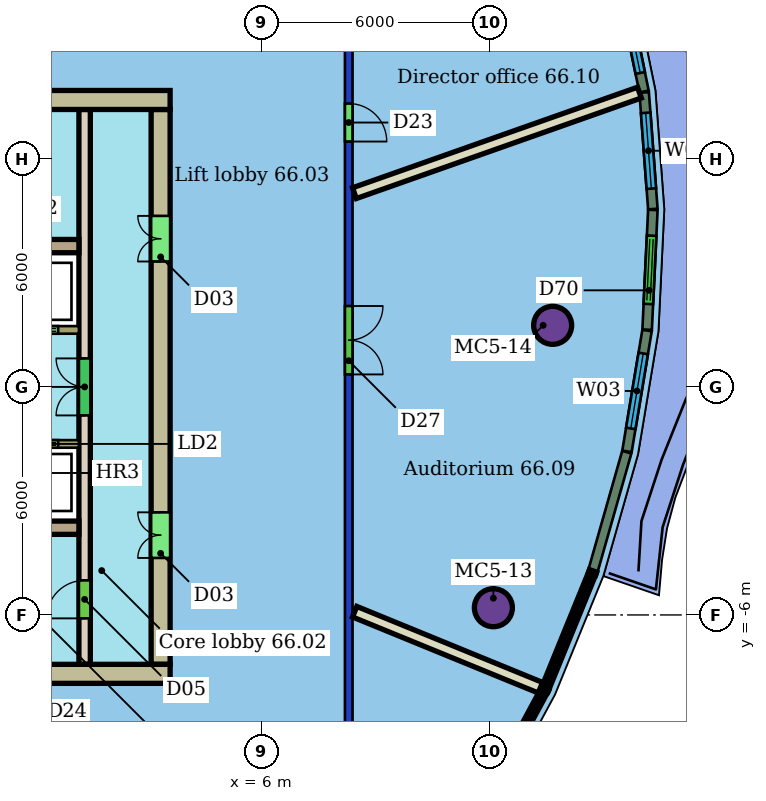
"""IFC4 building model, lengths in metres.
Left out: names, types, materials, properties, quantities, classifications, styles, units other than length and angle.
Written with IfcOpenShell. Run it as: python <this file> out.ifc"""

import sys

from ifc_helpers import new_model, si_unit, direction, frame, frame_2d, origin, origin_2d, place, context, subcontext, project, spatial, rectangle, hollow_circle, extrude, element, fill, save


model = new_model("IFC4")
c1 = context("Model", 3, precision=1e-05, world=origin(), true_north=direction((0.0, 1.0)))
c2 = subcontext(c1, "Body", "Model", "MODEL_VIEW")
j1 = project(units=[si_unit("LENGTHUNIT", "METRE"), si_unit("PLANEANGLEUNIT", "RADIAN")], contexts=[c1])
p1 = place(None, origin())
s1 = spatial("IfcSite", under=j1, at=p1, CompositionType="ELEMENT")
p2 = place(p1, origin())
s2 = spatial("IfcBuilding", under=s1, at=p2, CompositionType="ELEMENT")
p3 = place(p2, frame((0.0, 0.0, 268.5)))
s3 = spatial("IfcBuildingStorey", under=s2, at=p3, CompositionType="ELEMENT", Elevation=268.5)
for number, where, z_axis, x_axis in (
    (1, (12.106, -5.81, 0.0), (0.0, 0.0, 1.0), (1.0, 0.0, 0.0)),
    (2, (13.666, 1.62, 0.0), (0.0, 0.0, 1.0), (1.0, 0.0, 0.0)),
):
    element("IfcColumn", number, at=place(p3, frame(where, z_axis=z_axis, x_axis=x_axis)), inside=s3, PredefinedType="COLUMN", context=c2, shape_type="SweptSolid", body=[
        extrude(hollow_circle(Radius=0.5, WallThickness=0.04, at=origin_2d()), origin(), (0.0, 0.0, 1.0), 3.45),
    ])
p4 = place(p3, frame((8.3, 9.8, 0.0), z_axis=(0.0, 0.0, 1.0), x_axis=(0.0, -1.0, 0.0)))
e3 = element("IfcWall", 3, at=p4, inside=s3, PredefinedType="PARTITIONING", context=c2, shape_type="SweptSolid", body=[
    extrude(rectangle(XDim=19.6, YDim=0.2, at=frame_2d((9.8, 0.0))), origin(), (0.0, 0.0, 1.0), 3.1),
])
p5 = place(p4, frame((7.671, 0.0, 0.0)))
e4 = element("IfcOpeningElement", 4, at=p5, cuts=e3, PredefinedType="OPENING", context=c2, shape_type="SweptSolid", body=[
    extrude(rectangle(XDim=1.8, YDim=2.4, at=frame_2d((0.9, 1.2))), frame((0.0, 0.11, 0.0), z_axis=(0.0, -1.0, 0.0), x_axis=(1.0, 0.0, 0.0)), (0.0, 0.0, 1.0), 0.22),
])
p6 = place(p4, frame((2.344, 0.0, 0.0)))
e5 = element("IfcOpeningElement", 5, at=p6, cuts=e3, PredefinedType="OPENING", context=c2, shape_type="SweptSolid", body=[
    extrude(rectangle(XDim=1.0, YDim=2.4, at=frame_2d((0.5, 1.2))), frame((0.0, 0.11, 0.0), z_axis=(0.0, -1.0, 0.0), x_axis=(1.0, 0.0, 0.0)), (0.0, 0.0, 1.0), 0.22),
])
p7 = place(p3, frame((13.344, -7.915, 0.0), z_axis=(0.0, 0.0, 1.0), x_axis=(-0.925520438103, 0.378697661274, 0.0)))
e6 = element("IfcWall", 6, at=p7, inside=s3, PredefinedType="PARTITIONING", context=c2, shape_type="SweptSolid", body=[
    extrude(rectangle(XDim=5.28, YDim=0.3, at=frame_2d((2.64, 0.0))), origin(), (0.0, 0.0, 1.0), 3.45),
])
p8 = place(p3, frame((15.949, 7.744, 0.0), z_axis=(0.0, 0.0, 1.0), x_axis=(-0.943031701319, -0.332702885933, 0.0)))
e7 = element("IfcWall", 7, at=p8, inside=s3, PredefinedType="PARTITIONING", context=c2, shape_type="SweptSolid", body=[
    extrude(rectangle(XDim=7.952, YDim=0.3, at=frame_2d((3.976, 0.0))), origin(), (0.0, 0.0, 1.0), 3.45),
])
p9 = place(p3, frame((14.731, -4.826, 0.0), z_axis=(0.0, 0.0, 1.0), x_axis=(0.27386313883, 0.96176867343, 0.0)))
e8 = element("IfcWall", 8, at=p9, inside=s3, PredefinedType="SOLIDWALL", context=c2, shape_type="SweptSolid", body=[
    extrude(rectangle(XDim=3.232, YDim=0.25, at=frame_2d((1.616, 0.0))), origin(), (0.0, 0.0, 1.0), 3.15),
])
p10 = place(p3, frame((15.621, -1.696, 0.0), z_axis=(0.0, 0.0, 1.0), x_axis=(0.163956663746, 0.986467542504, 0.0)))
e9 = element("IfcWall", 9, at=p10, inside=s3, PredefinedType="SOLIDWALL", context=c2, shape_type="SweptSolid", body=[
    extrude(rectangle(XDim=3.222, YDim=0.25, at=frame_2d((1.611, 0.0))), origin(), (0.0, 0.0, 1.0), 3.15),
])
p11 = place(p10, frame((0.611, 0.0, 0.9)))
e10 = element("IfcOpeningElement", 10, at=p11, cuts=e9, PredefinedType="OPENING", context=c2, shape_type="SweptSolid", body=[
    extrude(rectangle(XDim=2.0, YDim=2.1, at=frame_2d((1.0, 1.05))), frame((0.0, 0.135, 0.0), z_axis=(0.0, -1.0, 0.0), x_axis=(1.0, 0.0, 0.0)), (0.0, 0.0, 1.0), 0.27),
])
p12 = place(p3, frame((16.152, 1.506, 0.0), z_axis=(0.0, 0.0, 1.0), x_axis=(0.047748991173, 0.998859366398, 0.0)))
e11 = element("IfcWall", 11, at=p12, inside=s3, PredefinedType="SOLIDWALL", context=c2, shape_type="SweptSolid", body=[
    extrude(rectangle(XDim=3.155, YDim=0.25, at=frame_2d((1.577, 0.0))), origin(), (0.0, 0.0, 1.0), 3.15),
])
p13 = place(p12, frame((0.677, 0.0, 0.0)))
e12 = element("IfcOpeningElement", 12, at=p13, cuts=e11, PredefinedType="OPENING", context=c2, shape_type="SweptSolid", body=[
    extrude(rectangle(XDim=1.8, YDim=2.4, at=frame_2d((0.9, 1.2))), frame((0.0, 0.135, 0.0), z_axis=(0.0, -1.0, 0.0), x_axis=(1.0, 0.0, 0.0)), (0.0, 0.0, 1.0), 0.27),
])
p14 = place(p3, frame((16.302, 4.68, 0.0), z_axis=(0.0, 0.0, 1.0), x_axis=(-0.074336319404, 0.997233228296, 0.0)))
e13 = element("IfcWall", 13, at=p14, inside=s3, PredefinedType="SOLIDWALL", context=c2, shape_type="SweptSolid", body=[
    extrude(rectangle(XDim=3.077, YDim=0.25, at=frame_2d((1.539, 0.0))), origin(), (0.0, 0.0, 1.0), 3.15),
])
p15 = place(p14, frame((0.539, 0.0, 0.9)))
e14 = element("IfcOpeningElement", 14, at=p15, cuts=e13, PredefinedType="OPENING", context=c2, shape_type="SweptSolid", body=[
    extrude(rectangle(XDim=2.0, YDim=2.1, at=frame_2d((1.0, 1.05))), frame((0.0, 0.135, 0.0), z_axis=(0.0, -1.0, 0.0), x_axis=(1.0, 0.0, 0.0)), (0.0, 0.0, 1.0), 0.27),
])
p16 = place(p3, frame((16.071, 7.773, 0.0), z_axis=(0.0, 0.0, 1.0), x_axis=(-0.201427510103, 0.979503424279, 0.0)))
e15 = element("IfcWall", 15, at=p16, inside=s3, PredefinedType="SOLIDWALL", context=c2, shape_type="SweptSolid", body=[
    extrude(rectangle(XDim=2.995, YDim=0.25, at=frame_2d((1.498, 0.0))), origin(), (0.0, 0.0, 1.0), 3.15),
])
p17 = place(p16, frame((0.498, 0.0, 0.9)))
e16 = element("IfcOpeningElement", 16, at=p17, cuts=e15, PredefinedType="OPENING", context=c2, shape_type="SweptSolid", body=[
    extrude(rectangle(XDim=2.0, YDim=2.1, at=frame_2d((1.0, 1.05))), frame((0.0, 0.135, 0.0), z_axis=(0.0, -1.0, 0.0), x_axis=(1.0, 0.0, 0.0)), (0.0, 0.0, 1.0), 0.27),
])
p18 = place(p3, frame((3.6, 7.55, 0.0), z_axis=(0.0, 0.0, 1.0), x_axis=(-1.0, 0.0, 0.0)))
e17 = element("IfcWall", 17, at=p18, inside=s3, PredefinedType="SHEAR", context=c2, shape_type="SweptSolid", body=[
    extrude(rectangle(XDim=9.6, YDim=0.5, at=frame_2d((4.8, 0.0))), origin(), (0.0, 0.0, 1.0), 3.3),
])
p19 = place(p18, frame((3.2, 0.0, 0.0)))
e18 = element("IfcOpeningElement", 18, at=p19, cuts=e17, PredefinedType="OPENING", context=c2, shape_type="SweptSolid", body=[
    extrude(rectangle(XDim=1.2, YDim=2.1, at=frame_2d((0.6, 1.05))), frame((0.0, 0.26, 0.0), z_axis=(0.0, -1.0, 0.0), x_axis=(1.0, 0.0, 0.0)), (0.0, 0.0, 1.0), 0.52),
])
p20 = place(p3, frame((-15.6, -7.55, 0.0), z_axis=(0.0, 0.0, 1.0), x_axis=(1.0, 0.0, 0.0)))
e19 = element("IfcWall", 19, at=p20, inside=s3, PredefinedType="SHEAR", context=c2, shape_type="SweptSolid", body=[
    extrude(rectangle(XDim=19.2, YDim=0.5, at=frame_2d((9.6, 0.0))), origin(), (0.0, 0.0, 1.0), 3.3),
])
p21 = place(p20, frame((3.6, 0.0, 0.0)))
e20 = element("IfcOpeningElement", 20, at=p21, cuts=e19, PredefinedType="OPENING", context=c2, shape_type="SweptSolid", body=[
    extrude(rectangle(XDim=1.2, YDim=2.1, at=frame_2d((0.6, 1.05))), frame((0.0, 0.26, 0.0), z_axis=(0.0, -1.0, 0.0), x_axis=(1.0, 0.0, 0.0)), (0.0, 0.0, 1.0), 0.52),
])
p22 = place(p3, frame((3.35, -7.3, 0.0), z_axis=(0.0, 0.0, 1.0), x_axis=(0.0, 1.0, 0.0)))
e21 = element("IfcWall", 21, at=p22, inside=s3, PredefinedType="SHEAR", context=c2, shape_type="SweptSolid", body=[
    extrude(rectangle(XDim=14.6, YDim=0.5, at=frame_2d((7.3, 0.0))), origin(), (0.0, 0.0, 1.0), 3.3),
])
p23 = place(p22, frame((2.8, 0.0, 0.0)))
e22 = element("IfcOpeningElement", 22, at=p23, cuts=e21, PredefinedType="OPENING", context=c2, shape_type="SweptSolid", body=[
    extrude(rectangle(XDim=1.2, YDim=2.1, at=frame_2d((0.6, 1.05))), frame((0.0, 0.26, 0.0), z_axis=(0.0, -1.0, 0.0), x_axis=(1.0, 0.0, 0.0)), (0.0, 0.0, 1.0), 0.52),
])
p24 = place(p22, frame((10.6, 0.0, 0.0)))
e23 = element("IfcOpeningElement", 23, at=p24, cuts=e21, PredefinedType="OPENING", context=c2, shape_type="SweptSolid", body=[
    extrude(rectangle(XDim=1.2, YDim=2.1, at=frame_2d((0.6, 1.05))), frame((0.0, 0.26, 0.0), z_axis=(0.0, -1.0, 0.0), x_axis=(1.0, 0.0, 0.0)), (0.0, 0.0, 1.0), 0.52),
])
for number, where, z_axis, x_axis in (
    (24, (-6.0, 3.705, 0.0), (0.0, 0.0, 1.0), (1.0, 0.0, 0.0)),
    (25, (-6.0, -3.705, 0.0), (0.0, 0.0, 1.0), (1.0, 0.0, 0.0)),
):
    element("IfcWall", number, at=place(p3, frame(where, z_axis=z_axis, x_axis=x_axis)), inside=s3, PredefinedType="SHEAR", context=c2, shape_type="SweptSolid", body=[
        extrude(rectangle(XDim=7.2, YDim=0.35, at=frame_2d((3.6, 0.0))), origin(), (0.0, 0.0, 1.0), 3.3),
    ])
p25 = place(p3, frame((1.35, -7.3, 0.0), z_axis=(0.0, 0.0, 1.0), x_axis=(0.0, 1.0, 0.0)))
e26 = element("IfcWall", 26, at=p25, inside=s3, PredefinedType="SHEAR", context=c2, shape_type="SweptSolid", body=[
    extrude(rectangle(XDim=14.6, YDim=0.3, at=frame_2d((7.3, 0.0))), origin(), (0.0, 0.0, 1.0), 3.3),
])
p26 = place(p25, frame((1.21, 0.0, 0.0)))
e27 = element("IfcOpeningElement", 27, at=p26, cuts=e26, PredefinedType="OPENING", context=c2, shape_type="SweptSolid", body=[
    extrude(rectangle(XDim=1.0, YDim=2.1, at=frame_2d((0.5, 1.05))), frame((0.0, 0.16, 0.0), z_axis=(0.0, -1.0, 0.0), x_axis=(1.0, 0.0, 0.0)), (0.0, 0.0, 1.0), 0.32),
])
p27 = place(p25, frame((6.55, 0.0, 0.0)))
e28 = element("IfcOpeningElement", 28, at=p27, cuts=e26, PredefinedType="OPENING", context=c2, shape_type="SweptSolid", body=[
    extrude(rectangle(XDim=1.5, YDim=2.1, at=frame_2d((0.75, 1.05))), frame((0.0, 0.16, 0.0), z_axis=(0.0, -1.0, 0.0), x_axis=(1.0, 0.0, 0.0)), (0.0, 0.0, 1.0), 0.32),
])
p28 = place(p3, frame((-13.2, 1.5, 0.0), z_axis=(0.0, 0.0, 1.0), x_axis=(1.0, 0.0, 0.0)))
e29 = element("IfcWall", 29, at=p28, inside=s3, PredefinedType="SHEAR", context=c2, shape_type="SweptSolid", body=[
    extrude(rectangle(XDim=14.4, YDim=0.2, at=frame_2d((7.2, 0.0))), origin(), (0.0, 0.0, 1.0), 3.3),
])
p29 = place(p28, frame((10.312, 0.0, 0.0)))
e30 = element("IfcOpeningElement", 30, at=p29, cuts=e29, PredefinedType="OPENING", context=c2, shape_type="SweptSolid", body=[
    extrude(rectangle(XDim=1.1, YDim=2.1, at=frame_2d((0.55, 1.05))), frame((0.0, 0.11, 0.0), z_axis=(0.0, -1.0, 0.0), x_axis=(1.0, 0.0, 0.0)), (0.0, 0.0, 1.0), 0.22),
])
p30 = place(p28, frame((12.754, 0.0, 0.0)))
e31 = element("IfcOpeningElement", 31, at=p30, cuts=e29, PredefinedType="OPENING", context=c2, shape_type="SweptSolid", body=[
    extrude(rectangle(XDim=1.1, YDim=2.1, at=frame_2d((0.55, 1.05))), frame((0.0, 0.11, 0.0), z_axis=(0.0, -1.0, 0.0), x_axis=(1.0, 0.0, 0.0)), (0.0, 0.0, 1.0), 0.22),
])
p31 = place(p28, frame((0.15, 0.0, 0.0)))
e32 = element("IfcOpeningElement", 32, at=p31, cuts=e29, PredefinedType="OPENING", context=c2, shape_type="SweptSolid", body=[
    extrude(rectangle(XDim=0.9, YDim=2.1, at=frame_2d((0.45, 1.05))), frame((0.0, 0.11, 0.0), z_axis=(0.0, -1.0, 0.0), x_axis=(1.0, 0.0, 0.0)), (0.0, 0.0, 1.0), 0.22),
])
p32 = place(p28, frame((4.983, 0.0, 0.0)))
e33 = element("IfcOpeningElement", 33, at=p32, cuts=e29, PredefinedType="OPENING", context=c2, shape_type="SweptSolid", body=[
    extrude(rectangle(XDim=0.9, YDim=2.1, at=frame_2d((0.45, 1.05))), frame((0.0, 0.11, 0.0), z_axis=(0.0, -1.0, 0.0), x_axis=(1.0, 0.0, 0.0)), (0.0, 0.0, 1.0), 0.22),
])
p33 = place(p3, frame((1.2, -1.5, 0.0), z_axis=(0.0, 0.0, 1.0), x_axis=(-1.0, 0.0, 0.0)))
e34 = element("IfcWall", 34, at=p33, inside=s3, PredefinedType="SHEAR", context=c2, shape_type="SweptSolid", body=[
    extrude(rectangle(XDim=14.4, YDim=0.2, at=frame_2d((7.2, 0.0))), origin(), (0.0, 0.0, 1.0), 3.3),
])
p34 = place(p33, frame((7.821, 0.0, 0.0)))
e35 = element("IfcOpeningElement", 35, at=p34, cuts=e34, PredefinedType="OPENING", context=c2, shape_type="SweptSolid", body=[
    extrude(rectangle(XDim=1.2, YDim=2.1, at=frame_2d((0.6, 1.05))), frame((0.0, 0.11, 0.0), z_axis=(0.0, -1.0, 0.0), x_axis=(1.0, 0.0, 0.0)), (0.0, 0.0, 1.0), 0.22),
])
p35 = place(p33, frame((0.546, 0.0, 0.0)))
e36 = element("IfcOpeningElement", 36, at=p35, cuts=e34, PredefinedType="OPENING", context=c2, shape_type="SweptSolid", body=[
    extrude(rectangle(XDim=1.1, YDim=2.1, at=frame_2d((0.55, 1.05))), frame((0.0, 0.11, 0.0), z_axis=(0.0, -1.0, 0.0), x_axis=(1.0, 0.0, 0.0)), (0.0, 0.0, 1.0), 0.22),
])
p36 = place(p33, frame((5.632, 0.0, 0.0)))
e37 = element("IfcOpeningElement", 37, at=p36, cuts=e34, PredefinedType="OPENING", context=c2, shape_type="SweptSolid", body=[
    extrude(rectangle(XDim=1.0, YDim=2.1, at=frame_2d((0.5, 1.05))), frame((0.0, 0.11, 0.0), z_axis=(0.0, -1.0, 0.0), x_axis=(1.0, 0.0, 0.0)), (0.0, 0.0, 1.0), 0.22),
])
p37 = place(p33, frame((2.592, 0.0, 0.0)))
e38 = element("IfcOpeningElement", 38, at=p37, cuts=e34, PredefinedType="OPENING", context=c2, shape_type="SweptSolid", body=[
    extrude(rectangle(XDim=1.0, YDim=2.1, at=frame_2d((0.5, 1.05))), frame((0.0, 0.11, 0.0), z_axis=(0.0, -1.0, 0.0), x_axis=(1.0, 0.0, 0.0)), (0.0, 0.0, 1.0), 0.22),
])
p38 = place(p5, origin())
e39 = element("IfcDoor", 39, at=p38, inside=s3, OperationType="DOUBLE_DOOR_SINGLE_SWING", PredefinedType="DOOR", context=c2, shape_type="SweptSolid", body=[
    extrude(rectangle(XDim=1.8, YDim=2.4, at=frame_2d((0.9, 1.2))), frame((0.0, 0.025, 0.0), z_axis=(0.0, -1.0, 0.0), x_axis=(1.0, 0.0, 0.0)), (0.0, 0.0, 1.0), 0.05),
])
fill(e4, e39)
p39 = place(p6, origin())
e40 = element("IfcDoor", 40, at=p39, inside=s3, OperationType="SINGLE_SWING_RIGHT", PredefinedType="DOOR", context=c2, shape_type="SweptSolid", body=[
    extrude(rectangle(XDim=1.0, YDim=2.4, at=frame_2d((0.5, 1.2))), frame((0.0, 0.025, 0.0), z_axis=(0.0, -1.0, 0.0), x_axis=(1.0, 0.0, 0.0)), (0.0, 0.0, 1.0), 0.05),
])
fill(e5, e40)
p40 = place(p11, origin())
e41 = element("IfcWindow", 41, at=p40, inside=s3, PartitioningType="SINGLE_PANEL", PredefinedType="WINDOW", context=c2, shape_type="SweptSolid", body=[
    extrude(rectangle(XDim=2.0, YDim=2.1, at=frame_2d((1.0, 1.05))), frame((0.0, 0.03, 0.0), z_axis=(0.0, -1.0, 0.0), x_axis=(1.0, 0.0, 0.0)), (0.0, 0.0, 1.0), 0.06),
])
fill(e10, e41)
p41 = place(p13, origin())
e42 = element("IfcDoor", 42, at=p41, inside=s3, OperationType="DOUBLE_DOOR_SLIDING", PredefinedType="DOOR", context=c2, shape_type="SweptSolid", body=[
    extrude(rectangle(XDim=1.8, YDim=2.4, at=frame_2d((0.9, 1.2))), frame((0.0, 0.025, 0.0), z_axis=(0.0, -1.0, 0.0), x_axis=(1.0, 0.0, 0.0)), (0.0, 0.0, 1.0), 0.05),
])
fill(e12, e42)
p42 = place(p15, origin())
e43 = element("IfcWindow", 43, at=p42, inside=s3, PartitioningType="SINGLE_PANEL", PredefinedType="WINDOW", context=c2, shape_type="SweptSolid", body=[
    extrude(rectangle(XDim=2.0, YDim=2.1, at=frame_2d((1.0, 1.05))), frame((0.0, 0.03, 0.0), z_axis=(0.0, -1.0, 0.0), x_axis=(1.0, 0.0, 0.0)), (0.0, 0.0, 1.0), 0.06),
])
fill(e14, e43)
p43 = place(p17, origin())
e44 = element("IfcWindow", 44, at=p43, inside=s3, PartitioningType="SINGLE_PANEL", PredefinedType="WINDOW", context=c2, shape_type="SweptSolid", body=[
    extrude(rectangle(XDim=2.0, YDim=2.1, at=frame_2d((1.0, 1.05))), frame((0.0, 0.03, 0.0), z_axis=(0.0, -1.0, 0.0), x_axis=(1.0, 0.0, 0.0)), (0.0, 0.0, 1.0), 0.06),
])
fill(e16, e44)
p44 = place(p23, origin())
e45 = element("IfcDoor", 45, at=p44, inside=s3, OperationType="DOUBLE_DOOR_SINGLE_SWING", PredefinedType="NOTDEFINED", context=c2, shape_type="SweptSolid", body=[
    extrude(rectangle(XDim=1.2, YDim=2.1, at=frame_2d((0.6, 1.05))), frame((0.0, 0.025, 0.0), z_axis=(0.0, -1.0, 0.0), x_axis=(1.0, 0.0, 0.0)), (0.0, 0.0, 1.0), 0.05),
])
fill(e22, e45)
p45 = place(p24, origin())
e46 = element("IfcDoor", 46, at=p45, inside=s3, OperationType="DOUBLE_DOOR_SINGLE_SWING", PredefinedType="NOTDEFINED", context=c2, shape_type="SweptSolid", body=[
    extrude(rectangle(XDim=1.2, YDim=2.1, at=frame_2d((0.6, 1.05))), frame((0.0, 0.025, 0.0), z_axis=(0.0, -1.0, 0.0), x_axis=(1.0, 0.0, 0.0)), (0.0, 0.0, 1.0), 0.05),
])
fill(e23, e46)
p46 = place(p26, origin())
e47 = element("IfcDoor", 47, at=p46, inside=s3, OperationType="SINGLE_SWING_LEFT", PredefinedType="NOTDEFINED", context=c2, shape_type="SweptSolid", body=[
    extrude(rectangle(XDim=1.0, YDim=2.1, at=frame_2d((0.5, 1.05))), frame((0.0, 0.025, 0.0), z_axis=(0.0, -1.0, 0.0), x_axis=(1.0, 0.0, 0.0)), (0.0, 0.0, 1.0), 0.05),
])
fill(e27, e47)
p47 = place(p27, origin())
e48 = element("IfcDoor", 48, at=p47, inside=s3, OperationType="DOUBLE_DOOR_SINGLE_SWING", PredefinedType="NOTDEFINED", context=c2, shape_type="SweptSolid", body=[
    extrude(rectangle(XDim=1.5, YDim=2.1, at=frame_2d((0.75, 1.05))), frame((0.0, 0.025, 0.0), z_axis=(0.0, -1.0, 0.0), x_axis=(1.0, 0.0, 0.0)), (0.0, 0.0, 1.0), 0.05),
])
fill(e28, e48)
p48 = place(p30, origin())
e49 = element("IfcDoor", 49, at=p48, inside=s3, OperationType="DOUBLE_DOOR_SLIDING", PredefinedType="NOTDEFINED", context=c2, shape_type="SweptSolid", body=[
    extrude(rectangle(XDim=1.1, YDim=2.1, at=frame_2d((0.55, 1.05))), frame((0.0, 0.025, 0.0), z_axis=(0.0, -1.0, 0.0), x_axis=(1.0, 0.0, 0.0)), (0.0, 0.0, 1.0), 0.05),
])
fill(e31, e49)
p49 = place(p35, origin())
e50 = element("IfcDoor", 50, at=p49, inside=s3, OperationType="DOUBLE_DOOR_SLIDING", PredefinedType="NOTDEFINED", context=c2, shape_type="SweptSolid", body=[
    extrude(rectangle(XDim=1.1, YDim=2.1, at=frame_2d((0.55, 1.05))), frame((0.0, 0.025, 0.0), z_axis=(0.0, -1.0, 0.0), x_axis=(1.0, 0.0, 0.0)), (0.0, 0.0, 1.0), 0.05),
])
fill(e36, e50)
save(model, sys.argv[1])
